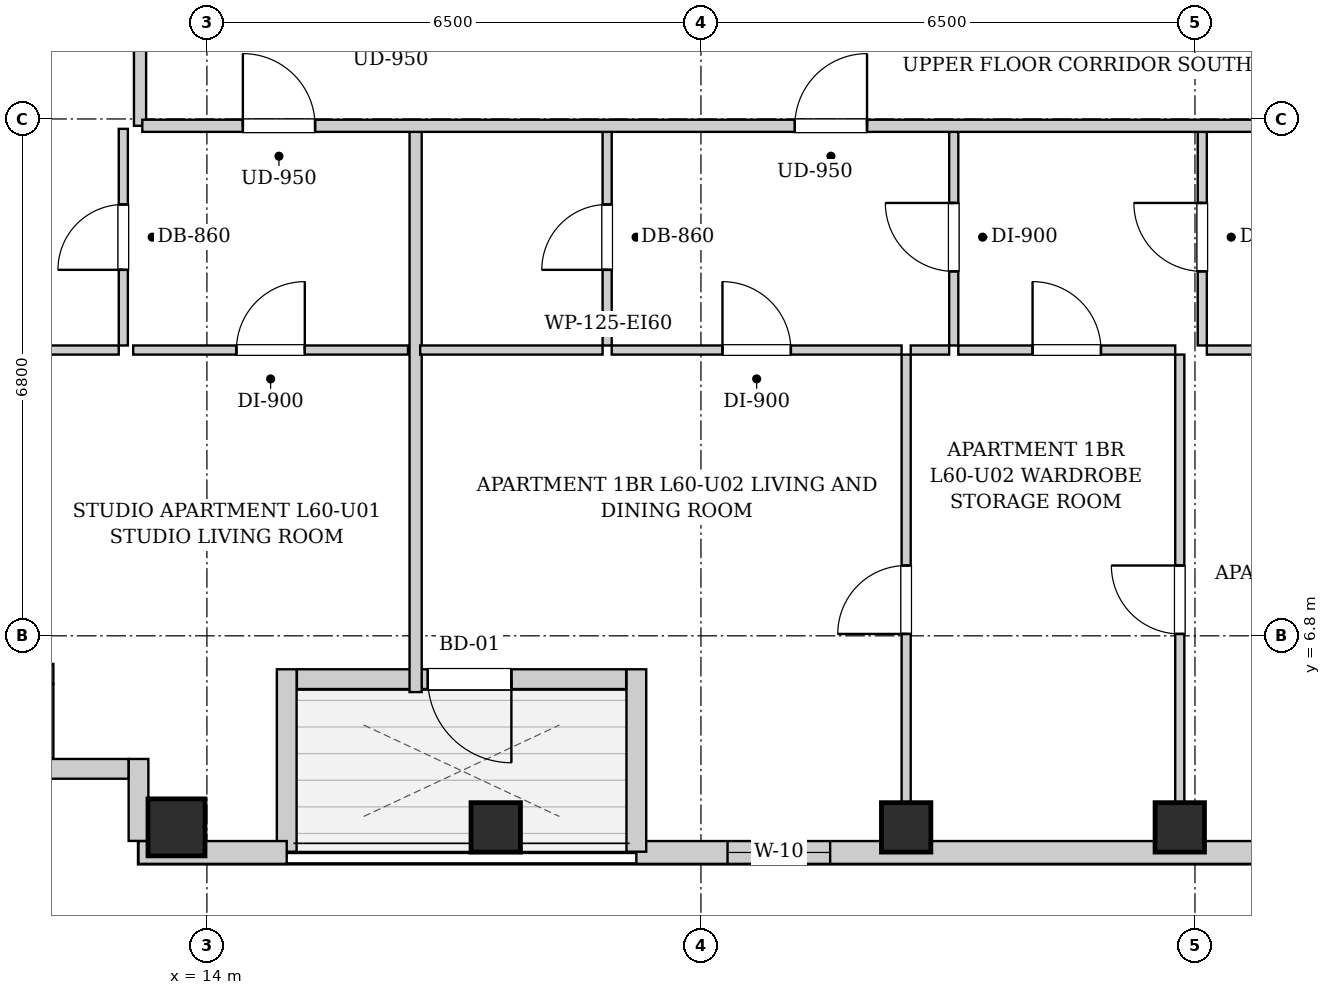
"""IFC4 building model, lengths in metres.
Left out: names, types, materials, properties, quantities, classifications, styles, units other than length and angle.
Written with IfcOpenShell. Run it as: python <this file> out.ifc"""

import sys

from ifc_helpers import new_model, si_unit, direction, frame, frame_2d, origin, origin_2d, place, context, subcontext, project, spatial, rectangle, extrude, element, fill, save


model = new_model("IFC4")
c1 = context("Model", 3, precision=1e-05, world=origin(), true_north=direction((0.0, 1.0)))
c2 = subcontext(c1, "Body", "Model", "MODEL_VIEW")
j1 = project(units=[si_unit("LENGTHUNIT", "METRE"), si_unit("PLANEANGLEUNIT", "RADIAN")], contexts=[c1])
p1 = place(None, origin())
s1 = spatial("IfcSite", under=j1, at=p1, CompositionType="ELEMENT")
p2 = place(p1, origin())
s2 = spatial("IfcBuilding", under=s1, at=p2, CompositionType="ELEMENT")
p3 = place(p2, frame((0.0, 0.0, 207.4)))
s3 = spatial("IfcBuildingStorey", under=s2, at=p3, CompositionType="ELEMENT", Elevation=207.4)
p4 = place(p3, frame((13.6, 4.28, 0.0), z_axis=(0.0, 0.0, 1.0), x_axis=(1.0, 0.0, 0.0)))
e1 = element("IfcColumn", 1, at=p4, inside=s3, PredefinedType="COLUMN", context=c2, shape_type="SweptSolid", body=[
    extrude(rectangle(XDim=0.75, YDim=0.75, at=origin_2d()), origin(), (0.0, 0.0, 1.0), 3.3),
])
for number, where, z_axis, x_axis in (
    (2, (17.8, 4.28, 0.0), (0.0, 0.0, 1.0), (1.0, 0.0, 0.0)),
    (3, (23.2, 4.28, 0.0), (0.0, 0.0, 1.0), (1.0, 0.0, 0.0)),
    (4, (26.8, 4.28, 0.0), (0.0, 0.0, 1.0), (1.0, 0.0, 0.0)),
):
    element("IfcColumn", number, at=place(p3, frame(where, z_axis=z_axis, x_axis=x_axis)), inside=s3, PredefinedType="COLUMN", context=c2, shape_type="SweptSolid", body=[
        extrude(rectangle(XDim=0.65, YDim=0.65, at=origin_2d()), origin(), (0.0, 0.0, 1.0), 3.3),
    ])
p5 = place(p3, frame((37.8, 3.95, 0.0), z_axis=(0.0, 0.0, 1.0), x_axis=(-1.0, 0.0, 0.0)))
e5 = element("IfcWall", 5, at=p5, inside=s3, PredefinedType="SOLIDWALL", context=c2, shape_type="SweptSolid", body=[
    extrude(rectangle(XDim=18.15, YDim=0.3, at=frame_2d((9.075, 0.0))), origin(), (0.0, 0.0, 1.0), 3.04),
])
p6 = place(p5, frame((15.6, 0.0, 0.55)))
e6 = element("IfcOpeningElement", 6, at=p6, cuts=e5, PredefinedType="OPENING", context=c2, shape_type="SweptSolid", body=[
    extrude(rectangle(XDim=1.35, YDim=1.2, at=frame_2d((0.675, 0.6))), frame((0.0, 0.16, 0.0), z_axis=(0.0, -1.0, 0.0), x_axis=(1.0, 0.0, 0.0)), (0.0, 0.0, 1.0), 0.32),
])
p7 = place(p5, frame((8.1, 0.0, 0.55)))
e7 = element("IfcOpeningElement", 7, at=p7, cuts=e5, PredefinedType="OPENING", context=c2, shape_type="SweptSolid", body=[
    extrude(rectangle(XDim=1.35, YDim=1.2, at=frame_2d((0.675, 0.6))), frame((0.0, 0.16, 0.0), z_axis=(0.0, -1.0, 0.0), x_axis=(1.0, 0.0, 0.0)), (0.0, 0.0, 1.0), 0.32),
])
p8 = place(p5, frame((2.7, 0.0, 0.55)))
e8 = element("IfcOpeningElement", 8, at=p8, cuts=e5, PredefinedType="OPENING", context=c2, shape_type="SweptSolid", body=[
    extrude(rectangle(XDim=1.35, YDim=1.2, at=frame_2d((0.675, 0.6))), frame((0.0, 0.16, 0.0), z_axis=(0.0, -1.0, 0.0), x_axis=(1.0, 0.0, 0.0)), (0.0, 0.0, 1.0), 0.32),
])
p9 = place(p5, frame((1.035, 0.0, 0.55)))
e9 = element("IfcOpeningElement", 9, at=p9, cuts=e5, PredefinedType="OPENING", context=c2, shape_type="SweptSolid", body=[
    extrude(rectangle(XDim=1.35, YDim=1.2, at=frame_2d((0.675, 0.6))), frame((0.0, 0.16, 0.0), z_axis=(0.0, -1.0, 0.0), x_axis=(1.0, 0.0, 0.0)), (0.0, 0.0, 1.0), 0.32),
])
p10 = place(p3, frame((19.65, 3.96, 0.0), z_axis=(0.0, 0.0, 1.0), x_axis=(0.0, 1.0, 0.0)))
e10 = element("IfcWall", 10, at=p10, inside=s3, PredefinedType="SOLIDWALL", context=c2, shape_type="SweptSolid", body=[
    extrude(rectangle(XDim=2.4, YDim=0.26, at=frame_2d((1.2, 0.0))), origin(), (0.0, 0.0, 1.0), 3.04),
])
p11 = place(p3, frame((19.516, 6.23, 0.0), z_axis=(0.0, 0.0, 1.0), x_axis=(-1.0, 0.0, 0.0)))
e11 = element("IfcWall", 11, at=p11, inside=s3, PredefinedType="SOLIDWALL", context=c2, shape_type="SweptSolid", body=[
    extrude(rectangle(XDim=4.332, YDim=0.26, at=frame_2d((2.166, 0.0))), origin(), (0.0, 0.0, 1.0), 3.04),
])
p12 = place(p11, frame((1.51, 0.0, 0.0)))
e12 = element("IfcOpeningElement", 12, at=p12, cuts=e11, PredefinedType="OPENING", context=c2, shape_type="SweptSolid", body=[
    extrude(rectangle(XDim=1.1, YDim=2.0, at=frame_2d((0.55, 1.0))), frame((0.0, 0.14, 0.0), z_axis=(0.0, -1.0, 0.0), x_axis=(1.0, 0.0, 0.0)), (0.0, 0.0, 1.0), 0.28),
])
p13 = place(p3, frame((15.05, 6.36, 0.0), z_axis=(0.0, 0.0, 1.0), x_axis=(0.0, -1.0, 0.0)))
e13 = element("IfcWall", 13, at=p13, inside=s3, PredefinedType="SOLIDWALL", context=c2, shape_type="SweptSolid", body=[
    extrude(rectangle(XDim=2.4, YDim=0.26, at=frame_2d((1.2, 0.0))), origin(), (0.0, 0.0, 1.0), 3.04),
])
p14 = place(p3, frame((15.05, 3.95, 0.0), z_axis=(0.0, 0.0, 1.0), x_axis=(-1.0, 0.0, 0.0)))
e14 = element("IfcWall", 14, at=p14, inside=s3, PredefinedType="SOLIDWALL", context=c2, shape_type="SweptSolid", body=[
    extrude(rectangle(XDim=1.95, YDim=0.3, at=frame_2d((0.975, 0.0))), origin(), (0.0, 0.0, 1.0), 3.04),
])
p15 = place(p3, frame((13.1, 4.102, 0.0), z_axis=(0.0, 0.0, 1.0), x_axis=(0.0, 1.0, 0.0)))
e15 = element("IfcWall", 15, at=p15, inside=s3, PredefinedType="SOLIDWALL", context=c2, shape_type="SweptSolid", body=[
    extrude(rectangle(XDim=1.078, YDim=0.26, at=frame_2d((0.539, 0.0))), origin(), (0.0, 0.0, 1.0), 3.04),
])
p16 = place(p3, frame((12.968, 5.05, 0.0), z_axis=(0.0, 0.0, 1.0), x_axis=(-1.0, 0.0, 0.0)))
e16 = element("IfcWall", 16, at=p16, inside=s3, PredefinedType="SOLIDWALL", context=c2, shape_type="SweptSolid", body=[
    extrude(rectangle(XDim=1.248, YDim=0.26, at=frame_2d((0.624, 0.0))), origin(), (0.0, 0.0, 1.0), 3.04),
])
p17 = place(p3, frame((11.85, 5.182, 0.0), z_axis=(0.0, 0.0, 1.0), x_axis=(0.0, 1.0, 0.0)))
e17 = element("IfcWall", 17, at=p17, inside=s3, PredefinedType="SOLIDWALL", context=c2, shape_type="SweptSolid", body=[
    extrude(rectangle(XDim=0.986, YDim=0.26, at=frame_2d((0.493, 0.0))), origin(), (0.0, 0.0, 1.0), 3.04),
])
p18 = place(p3, frame((11.98, 6.3, 0.0), z_axis=(0.0, 0.0, 1.0), x_axis=(-1.0, 0.0, 0.0)))
e18 = element("IfcWall", 18, at=p18, inside=s3, PredefinedType="SOLIDWALL", context=c2, shape_type="SweptSolid", body=[
    extrude(rectangle(XDim=1.078, YDim=0.26, at=frame_2d((0.539, 0.0))), origin(), (0.0, 0.0, 1.0), 3.04),
])
p19 = place(p3, frame((13.12, 13.51, 0.0), z_axis=(0.0, 0.0, 1.0), x_axis=(0.0, 1.0, 0.0)))
e19 = element("IfcWall", 19, at=p19, inside=s3, PredefinedType="PARTITIONING", context=c2, shape_type="SweptSolid", body=[
    extrude(rectangle(XDim=1.58, YDim=0.16, at=frame_2d((0.79, 0.0))), origin(), (0.0, 0.0, 1.0), 3.04),
])
p20 = place(p3, frame((12.9, 10.62, 0.0), z_axis=(0.0, 0.0, 1.0), x_axis=(0.0, 1.0, 0.0)))
e20 = element("IfcWall", 20, at=p20, inside=s3, PredefinedType="PARTITIONING", context=c2, shape_type="SweptSolid", body=[
    extrude(rectangle(XDim=2.85, YDim=0.12, at=frame_2d((1.425, 0.0))), origin(), (0.0, 0.0, 1.0), 3.04),
])
p21 = place(p20, frame((0.995, 0.0, 0.0)))
e21 = element("IfcOpeningElement", 21, at=p21, cuts=e20, PredefinedType="OPENING", context=c2, shape_type="SweptSolid", body=[
    extrude(rectangle(XDim=0.86, YDim=2.05, at=frame_2d((0.43, 1.025))), frame((0.0, 0.07, 0.0), z_axis=(0.0, -1.0, 0.0), x_axis=(1.0, 0.0, 0.0)), (0.0, 0.0, 1.0), 0.14),
])
p22 = place(p3, frame((10.99, 10.56, 0.0), z_axis=(0.0, 0.0, 1.0), x_axis=(1.0, 0.0, 0.0)))
e22 = element("IfcWall", 22, at=p22, inside=s3, PredefinedType="PARTITIONING", context=c2, shape_type="SweptSolid", body=[
    extrude(rectangle(XDim=1.85, YDim=0.12, at=frame_2d((0.925, 0.0))), origin(), (0.0, 0.0, 1.0), 3.04),
])
p23 = place(p3, frame((13.03, 10.56, 0.0), z_axis=(0.0, 0.0, 1.0), x_axis=(1.0, 0.0, 0.0)))
e23 = element("IfcWall", 23, at=p23, inside=s3, PredefinedType="PARTITIONING", context=c2, shape_type="SweptSolid", body=[
    extrude(rectangle(XDim=3.616, YDim=0.12, at=frame_2d((1.808, 0.0))), origin(), (0.0, 0.0, 1.0), 3.04),
])
p24 = place(p23, frame((1.358, 0.0, 0.0)))
e24 = element("IfcOpeningElement", 24, at=p24, cuts=e23, PredefinedType="OPENING", context=c2, shape_type="SweptSolid", body=[
    extrude(rectangle(XDim=0.9, YDim=2.05, at=frame_2d((0.45, 1.025))), frame((0.0, 0.07, 0.0), z_axis=(0.0, -1.0, 0.0), x_axis=(1.0, 0.0, 0.0)), (0.0, 0.0, 1.0), 0.14),
])
p25 = place(p3, frame((16.746, 6.06, 0.0), z_axis=(0.0, 0.0, 1.0), x_axis=(0.0, 1.0, 0.0)))
e25 = element("IfcWall", 25, at=p25, inside=s3, PredefinedType="PARTITIONING", context=c2, shape_type="SweptSolid", body=[
    extrude(rectangle(XDim=7.41, YDim=0.16, at=frame_2d((3.705, 0.0))), origin(), (0.0, 0.0, 1.0), 3.04),
])
p26 = place(p3, frame((19.266, 10.62, 0.0), z_axis=(0.0, 0.0, 1.0), x_axis=(0.0, 1.0, 0.0)))
e26 = element("IfcWall", 26, at=p26, inside=s3, PredefinedType="PARTITIONING", context=c2, shape_type="SweptSolid", body=[
    extrude(rectangle(XDim=2.85, YDim=0.12, at=frame_2d((1.425, 0.0))), origin(), (0.0, 0.0, 1.0), 3.04),
])
p27 = place(p26, frame((0.995, 0.0, 0.0)))
e27 = element("IfcOpeningElement", 27, at=p27, cuts=e26, PredefinedType="OPENING", context=c2, shape_type="SweptSolid", body=[
    extrude(rectangle(XDim=0.86, YDim=2.05, at=frame_2d((0.43, 1.025))), frame((0.0, 0.07, 0.0), z_axis=(0.0, -1.0, 0.0), x_axis=(1.0, 0.0, 0.0)), (0.0, 0.0, 1.0), 0.14),
])
p28 = place(p3, frame((16.806, 10.56, 0.0), z_axis=(0.0, 0.0, 1.0), x_axis=(1.0, 0.0, 0.0)))
e28 = element("IfcWall", 28, at=p28, inside=s3, PredefinedType="PARTITIONING", context=c2, shape_type="SweptSolid", body=[
    extrude(rectangle(XDim=2.4, YDim=0.12, at=frame_2d((1.2, 0.0))), origin(), (0.0, 0.0, 1.0), 3.04),
])
p29 = place(p3, frame((23.826, 10.62, 0.0), z_axis=(0.0, 0.0, 1.0), x_axis=(0.0, 1.0, 0.0)))
e29 = element("IfcWall", 29, at=p29, inside=s3, PredefinedType="PARTITIONING", context=c2, shape_type="SweptSolid", body=[
    extrude(rectangle(XDim=2.85, YDim=0.12, at=frame_2d((1.425, 0.0))), origin(), (0.0, 0.0, 1.0), 3.04),
])
p30 = place(p29, frame((0.975, 0.0, 0.0)))
e30 = element("IfcOpeningElement", 30, at=p30, cuts=e29, PredefinedType="OPENING", context=c2, shape_type="SweptSolid", body=[
    extrude(rectangle(XDim=0.9, YDim=2.05, at=frame_2d((0.45, 1.025))), frame((0.0, 0.07, 0.0), z_axis=(0.0, -1.0, 0.0), x_axis=(1.0, 0.0, 0.0)), (0.0, 0.0, 1.0), 0.14),
])
p31 = place(p3, frame((19.326, 10.56, 0.0), z_axis=(0.0, 0.0, 1.0), x_axis=(1.0, 0.0, 0.0)))
e31 = element("IfcWall", 31, at=p31, inside=s3, PredefinedType="PARTITIONING", context=c2, shape_type="SweptSolid", body=[
    extrude(rectangle(XDim=3.814, YDim=0.12, at=frame_2d((1.907, 0.0))), origin(), (0.0, 0.0, 1.0), 3.04),
])
p32 = place(p31, frame((1.457, 0.0, 0.0)))
e32 = element("IfcOpeningElement", 32, at=p32, cuts=e31, PredefinedType="OPENING", context=c2, shape_type="SweptSolid", body=[
    extrude(rectangle(XDim=0.9, YDim=2.05, at=frame_2d((0.45, 1.025))), frame((0.0, 0.07, 0.0), z_axis=(0.0, -1.0, 0.0), x_axis=(1.0, 0.0, 0.0)), (0.0, 0.0, 1.0), 0.14),
])
p33 = place(p3, frame((23.26, 10.56, 0.0), z_axis=(0.0, 0.0, 1.0), x_axis=(1.0, 0.0, 0.0)))
e33 = element("IfcWall", 33, at=p33, inside=s3, PredefinedType="PARTITIONING", context=c2, shape_type="SweptSolid", body=[
    extrude(rectangle(XDim=0.506, YDim=0.12, at=frame_2d((0.253, 0.0))), origin(), (0.0, 0.0, 1.0), 3.04),
])
p34 = place(p3, frame((27.096, 10.62, 0.0), z_axis=(0.0, 0.0, 1.0), x_axis=(0.0, 1.0, 0.0)))
e34 = element("IfcWall", 34, at=p34, inside=s3, PredefinedType="PARTITIONING", context=c2, shape_type="SweptSolid", body=[
    extrude(rectangle(XDim=2.85, YDim=0.12, at=frame_2d((1.425, 0.0))), origin(), (0.0, 0.0, 1.0), 3.04),
])
p35 = place(p34, frame((0.975, 0.0, 0.0)))
e35 = element("IfcOpeningElement", 35, at=p35, cuts=e34, PredefinedType="OPENING", context=c2, shape_type="SweptSolid", body=[
    extrude(rectangle(XDim=0.9, YDim=2.05, at=frame_2d((0.45, 1.025))), frame((0.0, 0.07, 0.0), z_axis=(0.0, -1.0, 0.0), x_axis=(1.0, 0.0, 0.0)), (0.0, 0.0, 1.0), 0.14),
])
p36 = place(p3, frame((23.886, 10.56, 0.0), z_axis=(0.0, 0.0, 1.0), x_axis=(1.0, 0.0, 0.0)))
e36 = element("IfcWall", 36, at=p36, inside=s3, PredefinedType="PARTITIONING", context=c2, shape_type="SweptSolid", body=[
    extrude(rectangle(XDim=2.854, YDim=0.12, at=frame_2d((1.427, 0.0))), origin(), (0.0, 0.0, 1.0), 3.04),
])
p37 = place(p36, frame((0.977, 0.0, 0.0)))
e37 = element("IfcOpeningElement", 37, at=p37, cuts=e36, PredefinedType="OPENING", context=c2, shape_type="SweptSolid", body=[
    extrude(rectangle(XDim=0.9, YDim=2.05, at=frame_2d((0.45, 1.025))), frame((0.0, 0.07, 0.0), z_axis=(0.0, -1.0, 0.0), x_axis=(1.0, 0.0, 0.0)), (0.0, 0.0, 1.0), 0.14),
])
p38 = place(p3, frame((27.156, 10.56, 0.0), z_axis=(0.0, 0.0, 1.0), x_axis=(1.0, 0.0, 0.0)))
e38 = element("IfcWall", 38, at=p38, inside=s3, PredefinedType="PARTITIONING", context=c2, shape_type="SweptSolid", body=[
    extrude(rectangle(XDim=4.03, YDim=0.12, at=frame_2d((2.015, 0.0))), origin(), (0.0, 0.0, 1.0), 3.04),
])
p39 = place(p38, frame((1.565, 0.0, 0.0)))
e39 = element("IfcOpeningElement", 39, at=p39, cuts=e38, PredefinedType="OPENING", context=c2, shape_type="SweptSolid", body=[
    extrude(rectangle(XDim=0.9, YDim=2.05, at=frame_2d((0.45, 1.025))), frame((0.0, 0.07, 0.0), z_axis=(0.0, -1.0, 0.0), x_axis=(1.0, 0.0, 0.0)), (0.0, 0.0, 1.0), 0.14),
])
p40 = place(p3, frame((23.2, 4.08, 0.0), z_axis=(0.0, 0.0, 1.0), x_axis=(0.0, 1.0, 0.0)))
e40 = element("IfcWall", 40, at=p40, inside=s3, PredefinedType="PARTITIONING", context=c2, shape_type="SweptSolid", body=[
    extrude(rectangle(XDim=6.42, YDim=0.12, at=frame_2d((3.21, 0.0))), origin(), (0.0, 0.0, 1.0), 3.04),
])
p41 = place(p40, frame((2.745, 0.0, 0.0)))
e41 = element("IfcOpeningElement", 41, at=p41, cuts=e40, PredefinedType="OPENING", context=c2, shape_type="SweptSolid", body=[
    extrude(rectangle(XDim=0.9, YDim=2.05, at=frame_2d((0.45, 1.025))), frame((0.0, 0.07, 0.0), z_axis=(0.0, -1.0, 0.0), x_axis=(1.0, 0.0, 0.0)), (0.0, 0.0, 1.0), 0.14),
])
p42 = place(p3, frame((26.8, 4.08, 0.0), z_axis=(0.0, 0.0, 1.0), x_axis=(0.0, 1.0, 0.0)))
e42 = element("IfcWall", 42, at=p42, inside=s3, PredefinedType="PARTITIONING", context=c2, shape_type="SweptSolid", body=[
    extrude(rectangle(XDim=6.42, YDim=0.12, at=frame_2d((3.21, 0.0))), origin(), (0.0, 0.0, 1.0), 3.04),
])
p43 = place(p42, frame((2.745, 0.0, 0.0)))
e43 = element("IfcOpeningElement", 43, at=p43, cuts=e42, PredefinedType="OPENING", context=c2, shape_type="SweptSolid", body=[
    extrude(rectangle(XDim=0.9, YDim=2.05, at=frame_2d((0.45, 1.025))), frame((0.0, 0.07, 0.0), z_axis=(0.0, -1.0, 0.0), x_axis=(1.0, 0.0, 0.0)), (0.0, 0.0, 1.0), 0.14),
])
p44 = place(p3, frame((13.15, 13.51, 0.0), z_axis=(0.0, 0.0, 1.0), x_axis=(1.0, 0.0, 0.0)))
e44 = element("IfcWall", 44, at=p44, inside=s3, PredefinedType="PARTITIONING", context=c2, shape_type="SweptSolid", body=[
    extrude(rectangle(XDim=24.6, YDim=0.16, at=frame_2d((12.3, 0.0))), origin(), (0.0, 0.0, 1.0), 3.04),
])
p45 = place(p44, frame((1.323, 0.0, 0.0)))
e45 = element("IfcOpeningElement", 45, at=p45, cuts=e44, PredefinedType="OPENING", context=c2, shape_type="SweptSolid", body=[
    extrude(rectangle(XDim=0.95, YDim=2.1, at=frame_2d((0.475, 1.05))), frame((0.0, 0.09, 0.0), z_axis=(0.0, -1.0, 0.0), x_axis=(1.0, 0.0, 0.0)), (0.0, 0.0, 1.0), 0.18),
])
p46 = place(p44, frame((8.585, 0.0, 0.0)))
e46 = element("IfcOpeningElement", 46, at=p46, cuts=e44, PredefinedType="OPENING", context=c2, shape_type="SweptSolid", body=[
    extrude(rectangle(XDim=0.95, YDim=2.1, at=frame_2d((0.475, 1.05))), frame((0.0, 0.09, 0.0), z_axis=(0.0, -1.0, 0.0), x_axis=(1.0, 0.0, 0.0)), (0.0, 0.0, 1.0), 0.18),
])
p47 = place(p44, frame((21.889, 0.0, 0.0)))
e47 = element("IfcOpeningElement", 47, at=p47, cuts=e44, PredefinedType="OPENING", context=c2, shape_type="SweptSolid", body=[
    extrude(rectangle(XDim=0.95, YDim=2.1, at=frame_2d((0.475, 1.05))), frame((0.0, 0.09, 0.0), z_axis=(0.0, -1.0, 0.0), x_axis=(1.0, 0.0, 0.0)), (0.0, 0.0, 1.0), 0.18),
])
p48 = place(p21, origin())
e48 = element("IfcDoor", 48, at=p48, inside=s3, OperationType="SINGLE_SWING_LEFT", PredefinedType="DOOR", context=c2, shape_type="SweptSolid", body=[
    extrude(rectangle(XDim=0.86, YDim=2.05, at=frame_2d((0.43, 1.025))), frame((0.0, 0.025, 0.0), z_axis=(0.0, -1.0, 0.0), x_axis=(1.0, 0.0, 0.0)), (0.0, 0.0, 1.0), 0.05),
])
fill(e21, e48)
p49 = place(p24, origin())
e49 = element("IfcDoor", 49, at=p49, inside=s3, OperationType="SINGLE_SWING_RIGHT", PredefinedType="DOOR", context=c2, shape_type="SweptSolid", body=[
    extrude(rectangle(XDim=0.9, YDim=2.05, at=frame_2d((0.45, 1.025))), frame((0.0, 0.025, 0.0), z_axis=(0.0, -1.0, 0.0), x_axis=(1.0, 0.0, 0.0)), (0.0, 0.0, 1.0), 0.05),
])
fill(e24, e49)
p50 = place(p27, origin())
e50 = element("IfcDoor", 50, at=p50, inside=s3, OperationType="SINGLE_SWING_LEFT", PredefinedType="DOOR", context=c2, shape_type="SweptSolid", body=[
    extrude(rectangle(XDim=0.86, YDim=2.05, at=frame_2d((0.43, 1.025))), frame((0.0, 0.025, 0.0), z_axis=(0.0, -1.0, 0.0), x_axis=(1.0, 0.0, 0.0)), (0.0, 0.0, 1.0), 0.05),
])
fill(e27, e50)
p51 = place(p30, origin())
e51 = element("IfcDoor", 51, at=p51, inside=s3, OperationType="SINGLE_SWING_RIGHT", PredefinedType="DOOR", context=c2, shape_type="SweptSolid", body=[
    extrude(rectangle(XDim=0.9, YDim=2.05, at=frame_2d((0.45, 1.025))), frame((0.0, 0.025, 0.0), z_axis=(0.0, -1.0, 0.0), x_axis=(1.0, 0.0, 0.0)), (0.0, 0.0, 1.0), 0.05),
])
fill(e30, e51)
p52 = place(p32, origin())
e52 = element("IfcDoor", 52, at=p52, inside=s3, OperationType="SINGLE_SWING_LEFT", PredefinedType="DOOR", context=c2, shape_type="SweptSolid", body=[
    extrude(rectangle(XDim=0.9, YDim=2.05, at=frame_2d((0.45, 1.025))), frame((0.0, 0.025, 0.0), z_axis=(0.0, -1.0, 0.0), x_axis=(1.0, 0.0, 0.0)), (0.0, 0.0, 1.0), 0.05),
])
fill(e32, e52)
p53 = place(p35, origin())
e53 = element("IfcDoor", 53, at=p53, inside=s3, OperationType="SINGLE_SWING_RIGHT", PredefinedType="DOOR", context=c2, shape_type="SweptSolid", body=[
    extrude(rectangle(XDim=0.9, YDim=2.05, at=frame_2d((0.45, 1.025))), frame((0.0, 0.025, 0.0), z_axis=(0.0, -1.0, 0.0), x_axis=(1.0, 0.0, 0.0)), (0.0, 0.0, 1.0), 0.05),
])
fill(e35, e53)
p54 = place(p37, origin())
e54 = element("IfcDoor", 54, at=p54, inside=s3, OperationType="SINGLE_SWING_LEFT", PredefinedType="DOOR", context=c2, shape_type="SweptSolid", body=[
    extrude(rectangle(XDim=0.9, YDim=2.05, at=frame_2d((0.45, 1.025))), frame((0.0, 0.025, 0.0), z_axis=(0.0, -1.0, 0.0), x_axis=(1.0, 0.0, 0.0)), (0.0, 0.0, 1.0), 0.05),
])
fill(e37, e54)
p55 = place(p41, origin())
e55 = element("IfcDoor", 55, at=p55, inside=s3, OperationType="SINGLE_SWING_LEFT", PredefinedType="DOOR", context=c2, shape_type="SweptSolid", body=[
    extrude(rectangle(XDim=0.9, YDim=2.05, at=frame_2d((0.45, 1.025))), frame((0.0, 0.025, 0.0), z_axis=(0.0, -1.0, 0.0), x_axis=(1.0, 0.0, 0.0)), (0.0, 0.0, 1.0), 0.05),
])
fill(e41, e55)
p56 = place(p43, origin())
e56 = element("IfcDoor", 56, at=p56, inside=s3, OperationType="SINGLE_SWING_RIGHT", PredefinedType="DOOR", context=c2, shape_type="SweptSolid", body=[
    extrude(rectangle(XDim=0.9, YDim=2.05, at=frame_2d((0.45, 1.025))), frame((0.0, 0.025, 0.0), z_axis=(0.0, -1.0, 0.0), x_axis=(1.0, 0.0, 0.0)), (0.0, 0.0, 1.0), 0.05),
])
fill(e43, e56)
p57 = place(p45, origin())
e57 = element("IfcDoor", 57, at=p57, inside=s3, OperationType="SINGLE_SWING_LEFT", PredefinedType="DOOR", context=c2, shape_type="SweptSolid", body=[
    extrude(rectangle(XDim=0.95, YDim=2.1, at=frame_2d((0.475, 1.05))), frame((0.0, 0.025, 0.0), z_axis=(0.0, -1.0, 0.0), x_axis=(1.0, 0.0, 0.0)), (0.0, 0.0, 1.0), 0.05),
])
fill(e45, e57)
p58 = place(p46, origin())
e58 = element("IfcDoor", 58, at=p58, inside=s3, OperationType="SINGLE_SWING_RIGHT", PredefinedType="DOOR", context=c2, shape_type="SweptSolid", body=[
    extrude(rectangle(XDim=0.95, YDim=2.1, at=frame_2d((0.475, 1.05))), frame((0.0, 0.025, 0.0), z_axis=(0.0, -1.0, 0.0), x_axis=(1.0, 0.0, 0.0)), (0.0, 0.0, 1.0), 0.05),
])
fill(e46, e58)
p59 = place(p12, origin())
e59 = element("IfcDoor", 59, at=p59, inside=s3, OperationType="SINGLE_SWING_LEFT", PredefinedType="DOOR", context=c2, shape_type="SweptSolid", body=[
    extrude(rectangle(XDim=1.1, YDim=2.0, at=frame_2d((0.55, 1.0))), frame((0.0, 0.025, 0.0), z_axis=(0.0, -1.0, 0.0), x_axis=(1.0, 0.0, 0.0)), (0.0, 0.0, 1.0), 0.05),
])
fill(e12, e59)
p60 = place(p6, origin())
e60 = element("IfcWindow", 60, at=p60, inside=s3, PartitioningType="SINGLE_PANEL", PredefinedType="WINDOW", context=c2, shape_type="SweptSolid", body=[
    extrude(rectangle(XDim=1.35, YDim=1.2, at=frame_2d((0.675, 0.6))), frame((0.0, 0.03, 0.0), z_axis=(0.0, -1.0, 0.0), x_axis=(1.0, 0.0, 0.0)), (0.0, 0.0, 1.0), 0.06),
])
fill(e6, e60)
save(model, sys.argv[1])
